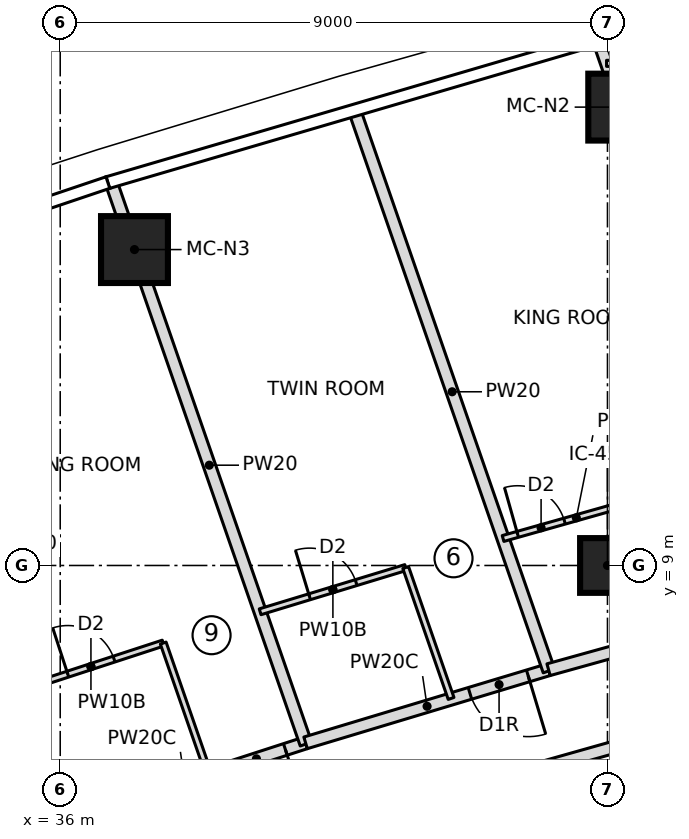
"""IFC4 building model, lengths in metres.
Left out: names, types, materials, properties, quantities, classifications, styles, units other than length and angle.
Written with IfcOpenShell. Run it as: python <this file> out.ifc"""

import sys

from ifc_helpers import new_model, si_unit, direction, frame, frame_2d, origin, origin_2d, place, context, subcontext, project, spatial, rectangle, extrude, element, fill, save


model = new_model("IFC4")
c1 = context("Model", 3, precision=1e-05, world=origin(), true_north=direction((0.0, 1.0)))
c2 = subcontext(c1, "Body", "Model", "MODEL_VIEW")
j1 = project(units=[si_unit("LENGTHUNIT", "METRE"), si_unit("PLANEANGLEUNIT", "RADIAN")], contexts=[c1])
p1 = place(None, origin())
s1 = spatial("IfcSite", under=j1, at=p1, CompositionType="ELEMENT")
p2 = place(p1, origin())
s2 = spatial("IfcBuilding", under=s1, at=p2, CompositionType="ELEMENT")
p3 = place(p2, frame((0.0, 0.0, 285.65)))
s3 = spatial("IfcBuildingStorey", under=s2, at=p3, CompositionType="ELEMENT", Elevation=285.65)
for number, where, z_axis, x_axis in (
    (1, (45.235, 16.539, 0.0), (0.0, 0.0, 1.0), (1.0, 0.0, 0.0)),
    (2, (37.221, 14.196, 0.0), (0.0, 0.0, 1.0), (1.0, 0.0, 0.0)),
):
    element("IfcColumn", number, at=place(p3, frame(where, z_axis=z_axis, x_axis=x_axis)), inside=s3, PredefinedType="COLUMN", context=c2, shape_type="SweptSolid", body=[
        extrude(rectangle(XDim=1.1, YDim=1.1, at=origin_2d()), origin(), (0.0, 0.0, 1.0), 3.55),
    ])
p4 = place(p3, frame((45.0, 9.0, 0.0), z_axis=(0.0, 0.0, 1.0), x_axis=(1.0, 0.0, 0.0)))
e3 = element("IfcColumn", 3, at=p4, inside=s3, PredefinedType="COLUMN", context=c2, shape_type="SweptSolid", body=[
    extrude(rectangle(XDim=0.9, YDim=0.9, at=origin_2d()), origin(), (0.0, 0.0, 1.0), 3.55),
])
p5 = place(p3, frame((36.071, 4.775, 0.0), z_axis=(0.0, 0.0, 1.0), x_axis=(-0.327725028322, 0.94477315045, 0.0)))
e4 = element("IfcWall", 4, at=p5, inside=s3, PredefinedType="PARTITIONING", context=c2, shape_type="SweptSolid", body=[
    extrude(rectangle(XDim=9.702, YDim=0.2, at=frame_2d((4.851, 0.0))), origin(), (0.0, 0.0, 1.0), 3.25),
])
p6 = place(p3, frame((40.035, 6.083, 0.0), z_axis=(0.0, 0.0, 1.0), x_axis=(-0.951196378796, -0.308586209941, 0.0)))
e5 = element("IfcWall", 5, at=p6, inside=s3, PredefinedType="PARTITIONING", context=c2, shape_type="SweptSolid", body=[
    extrude(rectangle(XDim=4.175, YDim=0.2, at=frame_2d((2.087, 0.0))), origin(), (0.0, 0.0, 1.0), 3.25),
])
p7 = place(p6, frame((0.35, 0.0, 0.0)))
e6 = element("IfcOpeningElement", 6, at=p7, cuts=e5, PredefinedType="OPENING", context=c2, shape_type="SweptSolid", body=[
    extrude(rectangle(XDim=1.0, YDim=2.1, at=frame_2d((0.5, 1.05))), frame((0.0, 0.11, 0.0), z_axis=(0.0, -1.0, 0.0), x_axis=(1.0, 0.0, 0.0)), (0.0, 0.0, 1.0), 0.22),
])
p8 = place(p3, frame((35.317, 6.948, 0.0), z_axis=(0.0, 0.0, 1.0), x_axis=(0.950666002187, 0.310216299194, 0.0)))
e7 = element("IfcWall", 7, at=p8, inside=s3, PredefinedType="PARTITIONING", context=c2, shape_type="SweptSolid", body=[
    extrude(rectangle(XDim=2.5, YDim=0.1, at=frame_2d((1.25, 0.0))), origin(), (0.0, 0.0, 1.0), 3.25),
])
p9 = place(p8, frame((0.85, 0.0, 0.0)))
e8 = element("IfcOpeningElement", 8, at=p9, cuts=e7, PredefinedType="OPENING", context=c2, shape_type="SweptSolid", body=[
    extrude(rectangle(XDim=0.8, YDim=2.1, at=frame_2d((0.4, 1.05))), frame((0.0, 0.06, 0.0), z_axis=(0.0, -1.0, 0.0), x_axis=(1.0, 0.0, 0.0)), (0.0, 0.0, 1.0), 0.12),
])
p10 = place(p3, frame((37.694, 7.724, 0.0), z_axis=(0.0, 0.0, 1.0), x_axis=(0.327622330203, -0.944808768351, 0.0)))
e9 = element("IfcWall", 9, at=p10, inside=s3, PredefinedType="PARTITIONING", context=c2, shape_type="SweptSolid", body=[
    extrude(rectangle(XDim=2.277, YDim=0.1, at=frame_2d((1.139, 0.0))), origin(), (0.0, 0.0, 1.0), 3.25),
])
p11 = place(p3, frame((40.042, 6.064, 0.0), z_axis=(0.0, 0.0, 1.0), x_axis=(-0.327710853631, 0.944778067279, 0.0)))
e10 = element("IfcWall", 10, at=p11, inside=s3, PredefinedType="PARTITIONING", context=c2, shape_type="SweptSolid", body=[
    extrude(rectangle(XDim=9.707, YDim=0.2, at=frame_2d((4.854, 0.0))), origin(), (0.0, 0.0, 1.0), 3.25),
])
p12 = place(p3, frame((44.031, 7.286, 0.0), z_axis=(0.0, 0.0, 1.0), x_axis=(-0.957521424208, -0.288362137222, 0.0)))
e11 = element("IfcWall", 11, at=p12, inside=s3, PredefinedType="PARTITIONING", context=c2, shape_type="SweptSolid", body=[
    extrude(rectangle(XDim=4.173, YDim=0.2, at=frame_2d((2.086, 0.0))), origin(), (0.0, 0.0, 1.0), 3.25),
])
p13 = place(p12, frame((0.35, 0.0, 0.0)))
e12 = element("IfcOpeningElement", 12, at=p13, cuts=e11, PredefinedType="OPENING", context=c2, shape_type="SweptSolid", body=[
    extrude(rectangle(XDim=1.0, YDim=2.1, at=frame_2d((0.5, 1.05))), frame((0.0, 0.11, 0.0), z_axis=(0.0, -1.0, 0.0), x_axis=(1.0, 0.0, 0.0)), (0.0, 0.0, 1.0), 0.22),
])
p14 = place(p3, frame((39.288, 8.238, 0.0), z_axis=(0.0, 0.0, 1.0), x_axis=(0.956723503196, 0.290998519638, 0.0)))
e13 = element("IfcWall", 13, at=p14, inside=s3, PredefinedType="PARTITIONING", context=c2, shape_type="SweptSolid", body=[
    extrude(rectangle(XDim=2.502, YDim=0.1, at=frame_2d((1.251, 0.0))), origin(), (0.0, 0.0, 1.0), 3.25),
])
p15 = place(p14, frame((0.85, 0.0, 0.0)))
e14 = element("IfcOpeningElement", 14, at=p15, cuts=e13, PredefinedType="OPENING", context=c2, shape_type="SweptSolid", body=[
    extrude(rectangle(XDim=0.8, YDim=2.1, at=frame_2d((0.4, 1.05))), frame((0.0, 0.06, 0.0), z_axis=(0.0, -1.0, 0.0), x_axis=(1.0, 0.0, 0.0)), (0.0, 0.0, 1.0), 0.12),
])
p16 = place(p3, frame((41.681, 8.966, 0.0), z_axis=(0.0, 0.0, 1.0), x_axis=(0.327743427431, -0.944766767925, 0.0)))
e15 = element("IfcWall", 15, at=p16, inside=s3, PredefinedType="PARTITIONING", context=c2, shape_type="SweptSolid", body=[
    extrude(rectangle(XDim=2.279, YDim=0.1, at=frame_2d((1.139, 0.0))), origin(), (0.0, 0.0, 1.0), 3.25),
])
p17 = place(p3, frame((44.038, 7.267, 0.0), z_axis=(0.0, 0.0, 1.0), x_axis=(-0.327714576096, 0.944776776077, 0.0)))
e16 = element("IfcWall", 16, at=p17, inside=s3, PredefinedType="PARTITIONING", context=c2, shape_type="SweptSolid", body=[
    extrude(rectangle(XDim=9.717, YDim=0.2, at=frame_2d((4.858, 0.0))), origin(), (0.0, 0.0, 1.0), 3.25),
])
p18 = place(p3, frame((48.299, 8.473, 0.0), z_axis=(0.0, 0.0, 1.0), x_axis=(-0.96343417102, -0.267945140115, 0.0)))
e17 = element("IfcWall", 17, at=p18, inside=s3, PredefinedType="PARTITIONING", context=c2, shape_type="SweptSolid", body=[
    extrude(rectangle(XDim=4.43, YDim=0.2, at=frame_2d((2.215, 0.0))), origin(), (0.0, 0.0, 1.0), 3.25),
])
p19 = place(p18, frame((0.603, 0.0, 0.0)))
e18 = element("IfcOpeningElement", 18, at=p19, cuts=e17, PredefinedType="OPENING", context=c2, shape_type="SweptSolid", body=[
    extrude(rectangle(XDim=1.0, YDim=2.1, at=frame_2d((0.5, 1.05))), frame((0.0, 0.11, 0.0), z_axis=(0.0, -1.0, 0.0), x_axis=(1.0, 0.0, 0.0)), (0.0, 0.0, 1.0), 0.22),
])
p20 = place(p3, frame((43.283, 9.444, 0.0), z_axis=(0.0, 0.0, 1.0), x_axis=(0.962409173596, 0.271603723424, 0.0)))
e19 = element("IfcWall", 19, at=p20, inside=s3, PredefinedType="PARTITIONING", context=c2, shape_type="SweptSolid", body=[
    extrude(rectangle(XDim=2.504, YDim=0.1, at=frame_2d((1.252, 0.0))), origin(), (0.0, 0.0, 1.0), 3.25),
])
p21 = place(p20, frame((0.25, 0.0, 0.0)))
e20 = element("IfcOpeningElement", 20, at=p21, cuts=e19, PredefinedType="OPENING", context=c2, shape_type="SweptSolid", body=[
    extrude(rectangle(XDim=0.8, YDim=2.1, at=frame_2d((0.4, 1.05))), frame((0.0, 0.06, 0.0), z_axis=(0.0, -1.0, 0.0), x_axis=(1.0, 0.0, 0.0)), (0.0, 0.0, 1.0), 0.12),
])
p22 = place(p3, frame((48.023, 8.5, 0.0), z_axis=(0.0, 0.0, 1.0), x_axis=(-0.327705598625, 0.944779890043, 0.0)))
e21 = element("IfcWall", 21, at=p22, inside=s3, PredefinedType="PARTITIONING", context=c2, shape_type="SweptSolid", body=[
    extrude(rectangle(XDim=9.61, YDim=0.2, at=frame_2d((4.805, 0.0))), origin(), (0.0, 0.0, 1.0), 3.25),
])
p23 = place(p3, frame((44.985, 17.259, 0.0), z_axis=(0.0, 0.0, 1.0), x_axis=(1.0, 0.0, 0.0)))
e22 = element("IfcWall", 22, at=p23, inside=s3, PredefinedType="PARTITIONING", context=c2, shape_type="SweptSolid", body=[
    extrude(rectangle(XDim=0.97, YDim=0.1, at=frame_2d((0.485, 0.0))), origin(), (0.0, 0.0, 1.0), 3.25),
])
p24 = place(p3, frame((43.918, 5.675, 0.0), z_axis=(0.0, 0.0, 1.0), x_axis=(0.962411212211, 0.271596499628, 0.0)))
e23 = element("IfcWall", 23, at=p24, inside=s3, PredefinedType="PARTITIONING", context=c2, shape_type="SweptSolid", body=[
    extrude(rectangle(XDim=3.913, YDim=0.2, at=frame_2d((1.957, 0.0))), origin(), (0.0, 0.0, 1.0), 3.25),
])
p25 = place(p24, frame((1.457, 0.0, 0.0)))
e24 = element("IfcOpeningElement", 24, at=p25, cuts=e23, PredefinedType="OPENING", context=c2, shape_type="SweptSolid", body=[
    extrude(rectangle(XDim=1.0, YDim=2.1, at=frame_2d((0.5, 1.05))), frame((0.0, 0.11, 0.0), z_axis=(0.0, -1.0, 0.0), x_axis=(1.0, 0.0, 0.0)), (0.0, 0.0, 1.0), 0.22),
])
p26 = place(p9, origin())
e25 = element("IfcDoor", 25, at=p26, inside=s3, OperationType="SINGLE_SWING_LEFT", PredefinedType="DOOR", context=c2, shape_type="SweptSolid", body=[
    extrude(rectangle(XDim=0.8, YDim=2.1, at=frame_2d((0.4, 1.05))), frame((0.0, 0.025, 0.0), z_axis=(0.0, -1.0, 0.0), x_axis=(1.0, 0.0, 0.0)), (0.0, 0.0, 1.0), 0.05),
])
fill(e8, e25)
p27 = place(p7, origin())
e26 = element("IfcDoor", 26, at=p27, inside=s3, OperationType="SINGLE_SWING_RIGHT", PredefinedType="DOOR", context=c2, shape_type="SweptSolid", body=[
    extrude(rectangle(XDim=1.0, YDim=2.1, at=frame_2d((0.5, 1.05))), frame((0.0, 0.025, 0.0), z_axis=(0.0, -1.0, 0.0), x_axis=(1.0, 0.0, 0.0)), (0.0, 0.0, 1.0), 0.05),
])
fill(e6, e26)
p28 = place(p15, origin())
e27 = element("IfcDoor", 27, at=p28, inside=s3, OperationType="SINGLE_SWING_LEFT", PredefinedType="DOOR", context=c2, shape_type="SweptSolid", body=[
    extrude(rectangle(XDim=0.8, YDim=2.1, at=frame_2d((0.4, 1.05))), frame((0.0, 0.025, 0.0), z_axis=(0.0, -1.0, 0.0), x_axis=(1.0, 0.0, 0.0)), (0.0, 0.0, 1.0), 0.05),
])
fill(e14, e27)
p29 = place(p13, origin())
e28 = element("IfcDoor", 28, at=p29, inside=s3, OperationType="SINGLE_SWING_RIGHT", PredefinedType="DOOR", context=c2, shape_type="SweptSolid", body=[
    extrude(rectangle(XDim=1.0, YDim=2.1, at=frame_2d((0.5, 1.05))), frame((0.0, 0.025, 0.0), z_axis=(0.0, -1.0, 0.0), x_axis=(1.0, 0.0, 0.0)), (0.0, 0.0, 1.0), 0.05),
])
fill(e12, e28)
p30 = place(p21, origin())
e29 = element("IfcDoor", 29, at=p30, inside=s3, OperationType="SINGLE_SWING_LEFT", PredefinedType="DOOR", context=c2, shape_type="SweptSolid", body=[
    extrude(rectangle(XDim=0.8, YDim=2.1, at=frame_2d((0.4, 1.05))), frame((0.0, 0.025, 0.0), z_axis=(0.0, -1.0, 0.0), x_axis=(1.0, 0.0, 0.0)), (0.0, 0.0, 1.0), 0.05),
])
fill(e20, e29)
save(model, sys.argv[1])
